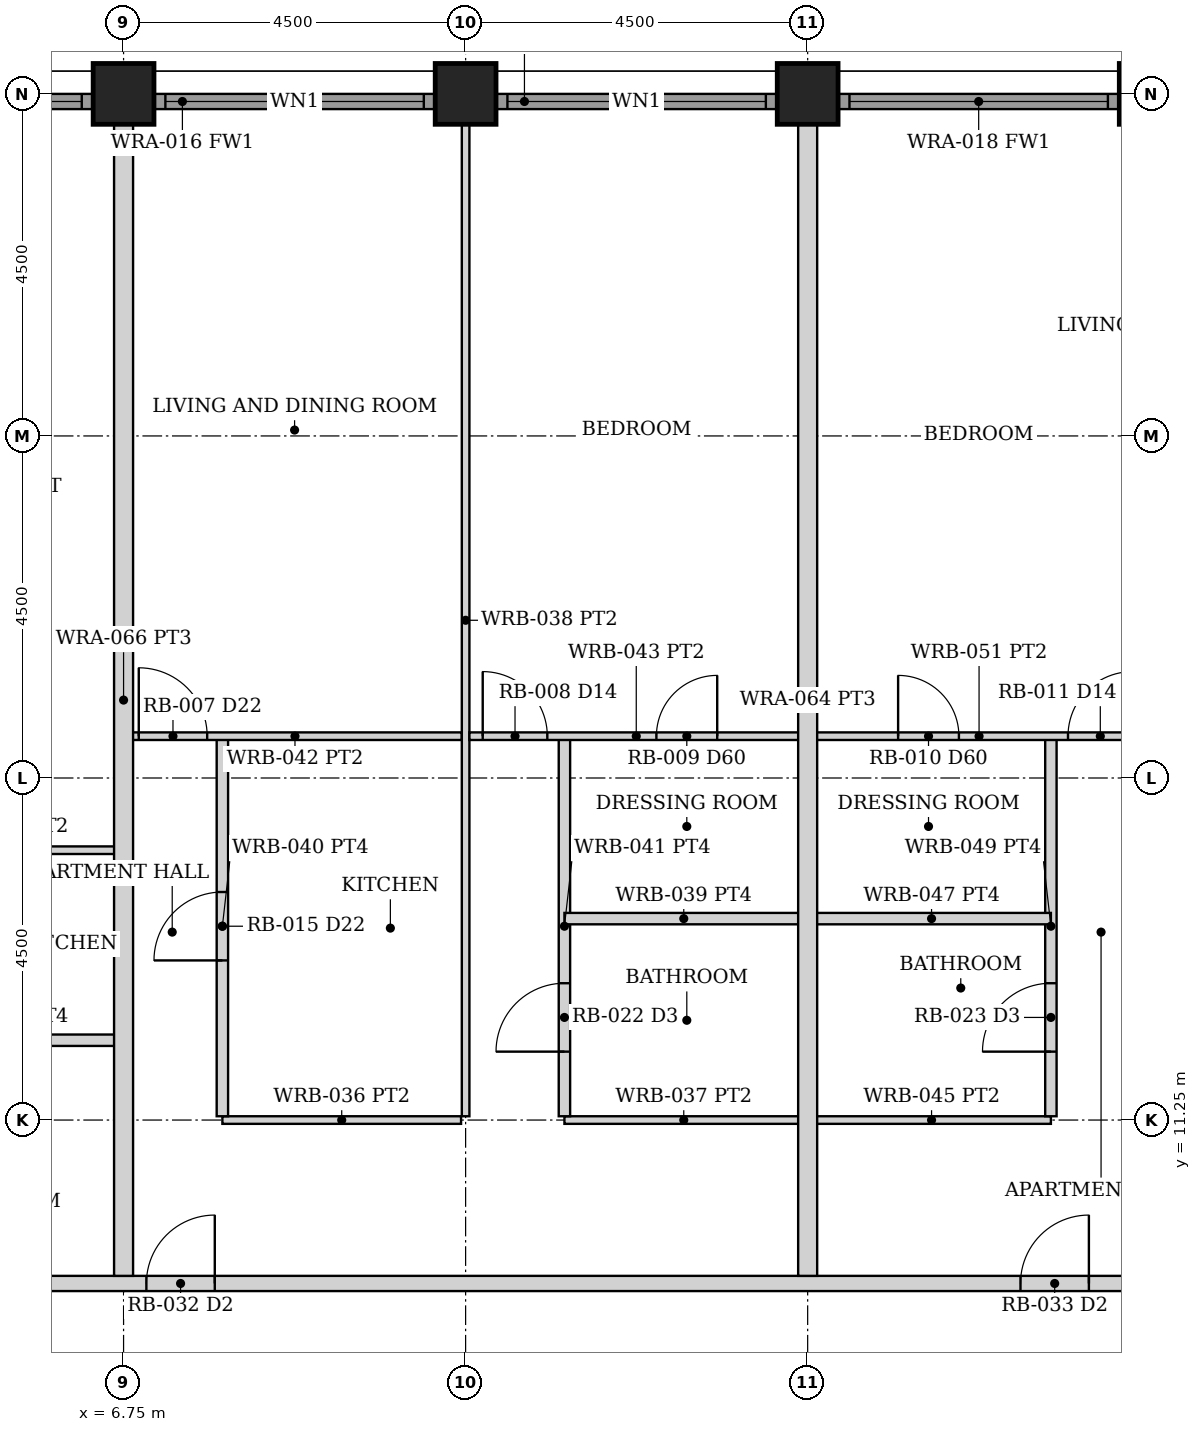
"""IFC4 building model, lengths in metres.
Left out: names, types, materials, properties, quantities, classifications, styles, units other than length and angle.
Written with IfcOpenShell. Run it as: python <this file> out.ifc"""

import sys

from ifc_helpers import new_model, si_unit, direction, frame, frame_2d, origin, origin_2d, place, context, subcontext, project, spatial, rectangle, hollow_rectangle, extrude, element, fill, save


model = new_model("IFC4")
c1 = context("Model", 3, precision=1e-05, world=origin(), true_north=direction((0.0, 1.0)))
c2 = subcontext(c1, "Body", "Model", "MODEL_VIEW")
j1 = project(units=[si_unit("LENGTHUNIT", "METRE"), si_unit("PLANEANGLEUNIT", "RADIAN")], contexts=[c1])
p1 = place(None, origin())
s1 = spatial("IfcSite", under=j1, at=p1, CompositionType="ELEMENT")
p2 = place(p1, origin())
s2 = spatial("IfcBuilding", under=s1, at=p2, CompositionType="ELEMENT")
p3 = place(p2, frame((0.0, 0.0, 37.0)))
s3 = spatial("IfcBuildingStorey", under=s2, at=p3, CompositionType="ELEMENT", Elevation=37.0)
for number, where, z_axis, x_axis in (
    (1, (6.75, 24.75, 0.0), (0.0, 0.0, 1.0), (0.0, 1.0, 0.0)),
    (2, (11.25, 24.75, 0.0), (0.0, 0.0, 1.0), (0.0, 1.0, 0.0)),
    (3, (15.75, 24.75, 0.0), (0.0, 0.0, 1.0), (0.0, 1.0, 0.0)),
    (4, (20.25, 24.75, 0.0), (0.0, 0.0, 1.0), (0.0, 1.0, 0.0)),
):
    element("IfcColumn", number, at=place(p3, frame(where, z_axis=z_axis, x_axis=x_axis)), inside=s3, PredefinedType="COLUMN", context=c2, shape_type="SweptSolid", body=[
        extrude(hollow_rectangle(XDim=0.8, YDim=0.8, WallThickness=0.07, at=origin_2d()), origin(), (0.0, 0.0, 1.0), 3.5),
    ])
p4 = place(p3, frame((2.655, 24.65, 0.0), z_axis=(0.0, 0.0, 1.0), x_axis=(1.0, 0.0, 0.0)))
e5 = element("IfcWall", 5, at=p4, inside=s3, PredefinedType="SOLIDWALL", context=c2, shape_type="SweptSolid", body=[
    extrude(rectangle(XDim=3.69, YDim=0.2, at=frame_2d((1.845, 0.0))), origin(), (0.0, 0.0, 1.0), 2.379),
])
p5 = place(p4, frame((0.145, 0.0, 0.3)))
e6 = element("IfcOpeningElement", 6, at=p5, cuts=e5, PredefinedType="OPENING", context=c2, shape_type="SweptSolid", body=[
    extrude(rectangle(XDim=3.4, YDim=1.929, at=frame_2d((1.7, 0.964))), frame((0.0, 0.11, 0.0), z_axis=(0.0, -1.0, 0.0), x_axis=(1.0, 0.0, 0.0)), (0.0, 0.0, 1.0), 0.22),
])
p6 = place(p3, frame((7.155, 24.65, 0.0), z_axis=(0.0, 0.0, 1.0), x_axis=(1.0, 0.0, 0.0)))
e7 = element("IfcWall", 7, at=p6, inside=s3, PredefinedType="SOLIDWALL", context=c2, shape_type="SweptSolid", body=[
    extrude(rectangle(XDim=3.69, YDim=0.2, at=frame_2d((1.845, 0.0))), origin(), (0.0, 0.0, 1.0), 2.379),
])
p7 = place(p6, frame((0.145, 0.0, 0.3)))
e8 = element("IfcOpeningElement", 8, at=p7, cuts=e7, PredefinedType="OPENING", context=c2, shape_type="SweptSolid", body=[
    extrude(rectangle(XDim=3.4, YDim=1.929, at=frame_2d((1.7, 0.964))), frame((0.0, 0.11, 0.0), z_axis=(0.0, -1.0, 0.0), x_axis=(1.0, 0.0, 0.0)), (0.0, 0.0, 1.0), 0.22),
])
p8 = place(p3, frame((11.655, 24.65, 0.0), z_axis=(0.0, 0.0, 1.0), x_axis=(1.0, 0.0, 0.0)))
e9 = element("IfcWall", 9, at=p8, inside=s3, PredefinedType="SOLIDWALL", context=c2, shape_type="SweptSolid", body=[
    extrude(rectangle(XDim=3.69, YDim=0.2, at=frame_2d((1.845, 0.0))), origin(), (0.0, 0.0, 1.0), 2.379),
])
p9 = place(p8, frame((0.145, 0.0, 0.3)))
e10 = element("IfcOpeningElement", 10, at=p9, cuts=e9, PredefinedType="OPENING", context=c2, shape_type="SweptSolid", body=[
    extrude(rectangle(XDim=3.4, YDim=1.929, at=frame_2d((1.7, 0.964))), frame((0.0, 0.11, 0.0), z_axis=(0.0, -1.0, 0.0), x_axis=(1.0, 0.0, 0.0)), (0.0, 0.0, 1.0), 0.22),
])
p10 = place(p3, frame((16.155, 24.65, 0.0), z_axis=(0.0, 0.0, 1.0), x_axis=(1.0, 0.0, 0.0)))
e11 = element("IfcWall", 11, at=p10, inside=s3, PredefinedType="SOLIDWALL", context=c2, shape_type="SweptSolid", body=[
    extrude(rectangle(XDim=3.69, YDim=0.2, at=frame_2d((1.845, 0.0))), origin(), (0.0, 0.0, 1.0), 2.379),
])
p11 = place(p10, frame((0.145, 0.0, 0.3)))
e12 = element("IfcOpeningElement", 12, at=p11, cuts=e11, PredefinedType="OPENING", context=c2, shape_type="SweptSolid", body=[
    extrude(rectangle(XDim=3.4, YDim=1.929, at=frame_2d((1.7, 0.964))), frame((0.0, 0.11, 0.0), z_axis=(0.0, -1.0, 0.0), x_axis=(1.0, 0.0, 0.0)), (0.0, 0.0, 1.0), 0.22),
])
p12 = place(p3, frame((-24.55, 9.1, 0.0), z_axis=(0.0, 0.0, 1.0), x_axis=(1.0, 0.0, 0.0)))
e13 = element("IfcWall", 13, at=p12, inside=s3, PredefinedType="PARTITIONING", context=c2, shape_type="SweptSolid", body=[
    extrude(rectangle(XDim=49.1, YDim=0.2, at=frame_2d((24.55, 0.0))), origin(), (0.0, 0.0, 1.0), 2.373),
])
p13 = place(p12, frame((5.1, 0.0, 0.0)))
e14 = element("IfcOpeningElement", 14, at=p13, cuts=e13, PredefinedType="OPENING", context=c2, shape_type="SweptSolid", body=[
    extrude(rectangle(XDim=0.9, YDim=2.1, at=frame_2d((0.45, 1.05))), frame((0.0, 0.11, 0.0), z_axis=(0.0, -1.0, 0.0), x_axis=(1.0, 0.0, 0.0)), (0.0, 0.0, 1.0), 0.22),
])
p14 = place(p12, frame((13.6, 0.0, 0.0)))
e15 = element("IfcOpeningElement", 15, at=p14, cuts=e13, PredefinedType="OPENING", context=c2, shape_type="SweptSolid", body=[
    extrude(rectangle(XDim=0.9, YDim=2.1, at=frame_2d((0.45, 1.05))), frame((0.0, 0.11, 0.0), z_axis=(0.0, -1.0, 0.0), x_axis=(1.0, 0.0, 0.0)), (0.0, 0.0, 1.0), 0.22),
])
p15 = place(p12, frame((18.0, 0.0, 0.0)))
e16 = element("IfcOpeningElement", 16, at=p15, cuts=e13, PredefinedType="OPENING", context=c2, shape_type="SweptSolid", body=[
    extrude(rectangle(XDim=0.9, YDim=2.1, at=frame_2d((0.45, 1.05))), frame((0.0, 0.11, 0.0), z_axis=(0.0, -1.0, 0.0), x_axis=(1.0, 0.0, 0.0)), (0.0, 0.0, 1.0), 0.22),
])
p16 = place(p12, frame((22.5, 0.0, 0.0)))
e17 = element("IfcOpeningElement", 17, at=p16, cuts=e13, PredefinedType="OPENING", context=c2, shape_type="SweptSolid", body=[
    extrude(rectangle(XDim=0.9, YDim=2.1, at=frame_2d((0.45, 1.05))), frame((0.0, 0.11, 0.0), z_axis=(0.0, -1.0, 0.0), x_axis=(1.0, 0.0, 0.0)), (0.0, 0.0, 1.0), 0.22),
])
p17 = place(p12, frame((27.0, 0.0, 0.0)))
e18 = element("IfcOpeningElement", 18, at=p17, cuts=e13, PredefinedType="OPENING", context=c2, shape_type="SweptSolid", body=[
    extrude(rectangle(XDim=0.9, YDim=2.1, at=frame_2d((0.45, 1.05))), frame((0.0, 0.11, 0.0), z_axis=(0.0, -1.0, 0.0), x_axis=(1.0, 0.0, 0.0)), (0.0, 0.0, 1.0), 0.22),
])
p18 = place(p12, frame((31.6, 0.0, 0.0)))
e19 = element("IfcOpeningElement", 19, at=p18, cuts=e13, PredefinedType="OPENING", context=c2, shape_type="SweptSolid", body=[
    extrude(rectangle(XDim=0.9, YDim=2.1, at=frame_2d((0.45, 1.05))), frame((0.0, 0.11, 0.0), z_axis=(0.0, -1.0, 0.0), x_axis=(1.0, 0.0, 0.0)), (0.0, 0.0, 1.0), 0.22),
])
p19 = place(p12, frame((43.1, 0.0, 0.0)))
e20 = element("IfcOpeningElement", 20, at=p19, cuts=e13, PredefinedType="OPENING", context=c2, shape_type="SweptSolid", body=[
    extrude(rectangle(XDim=0.9, YDim=2.1, at=frame_2d((0.45, 1.05))), frame((0.0, 0.11, 0.0), z_axis=(0.0, -1.0, 0.0), x_axis=(1.0, 0.0, 0.0)), (0.0, 0.0, 1.0), 0.22),
])
p20 = place(p3, frame((3.6, 12.3, 0.0), z_axis=(0.0, 0.0, 1.0), x_axis=(1.0, 0.0, 0.0)))
e21 = element("IfcWall", 21, at=p20, inside=s3, PredefinedType="PARTITIONING", context=c2, shape_type="SweptSolid", body=[
    extrude(rectangle(XDim=3.05, YDim=0.15, at=frame_2d((1.525, 0.0))), origin(), (0.0, 0.0, 1.0), 2.373),
])
p21 = place(p3, frame((3.6, 14.8, 0.0), z_axis=(0.0, 0.0, 1.0), x_axis=(1.0, 0.0, 0.0)))
e22 = element("IfcWall", 22, at=p21, inside=s3, PredefinedType="PARTITIONING", context=c2, shape_type="SweptSolid", body=[
    extrude(rectangle(XDim=3.05, YDim=0.1, at=frame_2d((1.525, 0.0))), origin(), (0.0, 0.0, 1.0), 2.373),
])
p22 = place(p3, frame((8.05, 11.25, 0.0), z_axis=(0.0, 0.0, 1.0), x_axis=(1.0, 0.0, 0.0)))
e23 = element("IfcWall", 23, at=p22, inside=s3, PredefinedType="PARTITIONING", context=c2, shape_type="SweptSolid", body=[
    extrude(rectangle(XDim=3.14, YDim=0.1, at=frame_2d((1.57, 0.0))), origin(), (0.0, 0.0, 1.0), 2.373),
])
p23 = place(p3, frame((8.05, 11.3, 0.0), z_axis=(0.0, 0.0, 1.0), x_axis=(0.0, 1.0, 0.0)))
e24 = element("IfcWall", 24, at=p23, inside=s3, PredefinedType="PARTITIONING", context=c2, shape_type="SweptSolid", body=[
    extrude(rectangle(XDim=5.0, YDim=0.15, at=frame_2d((2.5, 0.0))), origin(), (0.0, 0.0, 1.0), 2.373),
])
p24 = place(p23, frame((2.05, 0.0, 0.0)))
e25 = element("IfcOpeningElement", 25, at=p24, cuts=e24, PredefinedType="OPENING", context=c2, shape_type="SweptSolid", body=[
    extrude(rectangle(XDim=0.9, YDim=2.1, at=frame_2d((0.45, 1.05))), frame((0.0, 0.085, 0.0), z_axis=(0.0, -1.0, 0.0), x_axis=(1.0, 0.0, 0.0)), (0.0, 0.0, 1.0), 0.17),
])
p25 = place(p3, frame((6.81, 16.3, 0.0), z_axis=(0.0, 0.0, 1.0), x_axis=(1.0, 0.0, 0.0)))
e26 = element("IfcWall", 26, at=p25, inside=s3, PredefinedType="PARTITIONING", context=c2, shape_type="SweptSolid", body=[
    extrude(rectangle(XDim=4.39, YDim=0.1, at=frame_2d((2.195, 0.0))), origin(), (0.0, 0.0, 1.0), 2.373),
])
p26 = place(p25, frame((0.14, 0.0, 0.0)))
e27 = element("IfcOpeningElement", 27, at=p26, cuts=e26, PredefinedType="OPENING", context=c2, shape_type="SweptSolid", body=[
    extrude(rectangle(XDim=0.9, YDim=2.1, at=frame_2d((0.45, 1.05))), frame((0.0, 0.06, 0.0), z_axis=(0.0, -1.0, 0.0), x_axis=(1.0, 0.0, 0.0)), (0.0, 0.0, 1.0), 0.12),
])
p27 = place(p3, frame((11.25, 11.3, 0.0), z_axis=(0.0, 0.0, 1.0), x_axis=(0.0, 1.0, 0.0)))
e28 = element("IfcWall", 28, at=p27, inside=s3, PredefinedType="PARTITIONING", context=c2, shape_type="SweptSolid", body=[
    extrude(rectangle(XDim=13.05, YDim=0.1, at=frame_2d((6.525, 0.0))), origin(), (0.0, 0.0, 1.0), 2.373),
])
p28 = place(p3, frame((12.55, 11.25, 0.0), z_axis=(0.0, 0.0, 1.0), x_axis=(1.0, 0.0, 0.0)))
e29 = element("IfcWall", 29, at=p28, inside=s3, PredefinedType="PARTITIONING", context=c2, shape_type="SweptSolid", body=[
    extrude(rectangle(XDim=3.14, YDim=0.1, at=frame_2d((1.57, 0.0))), origin(), (0.0, 0.0, 1.0), 2.373),
])
p29 = place(p3, frame((12.55, 11.3, 0.0), z_axis=(0.0, 0.0, 1.0), x_axis=(0.0, 1.0, 0.0)))
e30 = element("IfcWall", 30, at=p29, inside=s3, PredefinedType="PARTITIONING", context=c2, shape_type="SweptSolid", body=[
    extrude(rectangle(XDim=5.0, YDim=0.15, at=frame_2d((2.5, 0.0))), origin(), (0.0, 0.0, 1.0), 2.373),
])
p30 = place(p29, frame((0.85, 0.0, 0.0)))
e31 = element("IfcOpeningElement", 31, at=p30, cuts=e30, PredefinedType="OPENING", context=c2, shape_type="SweptSolid", body=[
    extrude(rectangle(XDim=0.9, YDim=2.1, at=frame_2d((0.45, 1.05))), frame((0.0, 0.085, 0.0), z_axis=(0.0, -1.0, 0.0), x_axis=(1.0, 0.0, 0.0)), (0.0, 0.0, 1.0), 0.17),
])
p31 = place(p3, frame((11.3, 16.3, 0.0), z_axis=(0.0, 0.0, 1.0), x_axis=(1.0, 0.0, 0.0)))
e32 = element("IfcWall", 32, at=p31, inside=s3, PredefinedType="PARTITIONING", context=c2, shape_type="SweptSolid", body=[
    extrude(rectangle(XDim=4.39, YDim=0.1, at=frame_2d((2.195, 0.0))), origin(), (0.0, 0.0, 1.0), 2.373),
])
p32 = place(p31, frame((0.175, 0.0, 0.0)))
e33 = element("IfcOpeningElement", 33, at=p32, cuts=e32, PredefinedType="OPENING", context=c2, shape_type="SweptSolid", body=[
    extrude(rectangle(XDim=0.85, YDim=2.1, at=frame_2d((0.425, 1.05))), frame((0.0, 0.06, 0.0), z_axis=(0.0, -1.0, 0.0), x_axis=(1.0, 0.0, 0.0)), (0.0, 0.0, 1.0), 0.12),
])
p33 = place(p31, frame((2.46, 0.0, 0.0)))
e34 = element("IfcOpeningElement", 34, at=p33, cuts=e32, PredefinedType="OPENING", context=c2, shape_type="SweptSolid", body=[
    extrude(rectangle(XDim=0.8, YDim=2.1, at=frame_2d((0.4, 1.05))), frame((0.0, 0.06, 0.0), z_axis=(0.0, -1.0, 0.0), x_axis=(1.0, 0.0, 0.0)), (0.0, 0.0, 1.0), 0.12),
])
p34 = place(p3, frame((12.55, 13.9, 0.0), z_axis=(0.0, 0.0, 1.0), x_axis=(1.0, 0.0, 0.0)))
e35 = element("IfcWall", 35, at=p34, inside=s3, PredefinedType="PARTITIONING", context=c2, shape_type="SweptSolid", body=[
    extrude(rectangle(XDim=3.14, YDim=0.15, at=frame_2d((1.57, 0.0))), origin(), (0.0, 0.0, 1.0), 2.373),
])
p35 = place(p3, frame((15.81, 11.25, 0.0), z_axis=(0.0, 0.0, 1.0), x_axis=(1.0, 0.0, 0.0)))
e36 = element("IfcWall", 36, at=p35, inside=s3, PredefinedType="PARTITIONING", context=c2, shape_type="SweptSolid", body=[
    extrude(rectangle(XDim=3.14, YDim=0.1, at=frame_2d((1.57, 0.0))), origin(), (0.0, 0.0, 1.0), 2.373),
])
p36 = place(p3, frame((18.95, 11.3, 0.0), z_axis=(0.0, 0.0, 1.0), x_axis=(0.0, 1.0, 0.0)))
e37 = element("IfcWall", 37, at=p36, inside=s3, PredefinedType="PARTITIONING", context=c2, shape_type="SweptSolid", body=[
    extrude(rectangle(XDim=5.0, YDim=0.15, at=frame_2d((2.5, 0.0))), origin(), (0.0, 0.0, 1.0), 2.373),
])
p37 = place(p36, frame((0.85, 0.0, 0.0)))
e38 = element("IfcOpeningElement", 38, at=p37, cuts=e37, PredefinedType="OPENING", context=c2, shape_type="SweptSolid", body=[
    extrude(rectangle(XDim=0.9, YDim=2.1, at=frame_2d((0.45, 1.05))), frame((0.0, 0.085, 0.0), z_axis=(0.0, -1.0, 0.0), x_axis=(1.0, 0.0, 0.0)), (0.0, 0.0, 1.0), 0.17),
])
p38 = place(p3, frame((15.81, 16.3, 0.0), z_axis=(0.0, 0.0, 1.0), x_axis=(1.0, 0.0, 0.0)))
e39 = element("IfcWall", 39, at=p38, inside=s3, PredefinedType="PARTITIONING", context=c2, shape_type="SweptSolid", body=[
    extrude(rectangle(XDim=4.39, YDim=0.1, at=frame_2d((2.195, 0.0))), origin(), (0.0, 0.0, 1.0), 2.373),
])
p39 = place(p38, frame((3.365, 0.0, 0.0)))
e40 = element("IfcOpeningElement", 40, at=p39, cuts=e39, PredefinedType="OPENING", context=c2, shape_type="SweptSolid", body=[
    extrude(rectangle(XDim=0.85, YDim=2.1, at=frame_2d((0.425, 1.05))), frame((0.0, 0.06, 0.0), z_axis=(0.0, -1.0, 0.0), x_axis=(1.0, 0.0, 0.0)), (0.0, 0.0, 1.0), 0.12),
])
p40 = place(p38, frame((1.13, 0.0, 0.0)))
e41 = element("IfcOpeningElement", 41, at=p40, cuts=e39, PredefinedType="OPENING", context=c2, shape_type="SweptSolid", body=[
    extrude(rectangle(XDim=0.8, YDim=2.1, at=frame_2d((0.4, 1.05))), frame((0.0, 0.06, 0.0), z_axis=(0.0, -1.0, 0.0), x_axis=(1.0, 0.0, 0.0)), (0.0, 0.0, 1.0), 0.12),
])
p41 = place(p3, frame((15.81, 13.9, 0.0), z_axis=(0.0, 0.0, 1.0), x_axis=(1.0, 0.0, 0.0)))
e42 = element("IfcWall", 42, at=p41, inside=s3, PredefinedType="PARTITIONING", context=c2, shape_type="SweptSolid", body=[
    extrude(rectangle(XDim=3.14, YDim=0.15, at=frame_2d((1.57, 0.0))), origin(), (0.0, 0.0, 1.0), 2.373),
])
for number, where, z_axis, x_axis in (
    (43, (6.75, 9.2, 0.0), (0.0, 0.0, 1.0), (0.0, 1.0, 0.0)),
    (44, (15.75, 9.2, 0.0), (0.0, 0.0, 1.0), (0.0, 1.0, 0.0)),
):
    element("IfcWall", number, at=place(p3, frame(where, z_axis=z_axis, x_axis=x_axis)), inside=s3, PredefinedType="PARTITIONING", context=c2, shape_type="SweptSolid", body=[
        extrude(rectangle(XDim=15.15, YDim=0.25, at=frame_2d((7.575, 0.0))), origin(), (0.0, 0.0, 1.0), 2.373),
    ])
p42 = place(p5, origin())
e45 = element("IfcWindow", 45, at=p42, inside=s3, PartitioningType="SINGLE_PANEL", PredefinedType="WINDOW", context=c2, shape_type="SweptSolid", body=[
    extrude(rectangle(XDim=3.4, YDim=1.929, at=frame_2d((1.7, 0.964))), frame((0.0, 0.03, 0.0), z_axis=(0.0, -1.0, 0.0), x_axis=(1.0, 0.0, 0.0)), (0.0, 0.0, 1.0), 0.06),
])
fill(e6, e45)
p43 = place(p7, origin())
e46 = element("IfcWindow", 46, at=p43, inside=s3, PartitioningType="SINGLE_PANEL", PredefinedType="WINDOW", context=c2, shape_type="SweptSolid", body=[
    extrude(rectangle(XDim=3.4, YDim=1.929, at=frame_2d((1.7, 0.964))), frame((0.0, 0.03, 0.0), z_axis=(0.0, -1.0, 0.0), x_axis=(1.0, 0.0, 0.0)), (0.0, 0.0, 1.0), 0.06),
])
fill(e8, e46)
p44 = place(p9, origin())
e47 = element("IfcWindow", 47, at=p44, inside=s3, PartitioningType="SINGLE_PANEL", PredefinedType="WINDOW", context=c2, shape_type="SweptSolid", body=[
    extrude(rectangle(XDim=3.4, YDim=1.929, at=frame_2d((1.7, 0.964))), frame((0.0, 0.03, 0.0), z_axis=(0.0, -1.0, 0.0), x_axis=(1.0, 0.0, 0.0)), (0.0, 0.0, 1.0), 0.06),
])
fill(e10, e47)
p45 = place(p11, origin())
e48 = element("IfcWindow", 48, at=p45, inside=s3, PartitioningType="SINGLE_PANEL", PredefinedType="WINDOW", context=c2, shape_type="SweptSolid", body=[
    extrude(rectangle(XDim=3.4, YDim=1.929, at=frame_2d((1.7, 0.964))), frame((0.0, 0.03, 0.0), z_axis=(0.0, -1.0, 0.0), x_axis=(1.0, 0.0, 0.0)), (0.0, 0.0, 1.0), 0.06),
])
fill(e12, e48)
p46 = place(p18, origin())
e49 = element("IfcDoor", 49, at=p46, inside=s3, OperationType="SINGLE_SWING_RIGHT", PredefinedType="DOOR", context=c2, shape_type="SweptSolid", body=[
    extrude(rectangle(XDim=0.9, YDim=2.1, at=frame_2d((0.45, 1.05))), frame((0.0, 0.025, 0.0), z_axis=(0.0, -1.0, 0.0), x_axis=(1.0, 0.0, 0.0)), (0.0, 0.0, 1.0), 0.05),
])
fill(e19, e49)
p47 = place(p24, origin())
e50 = element("IfcDoor", 50, at=p47, inside=s3, OperationType="SINGLE_SWING_LEFT", PredefinedType="DOOR", context=c2, shape_type="SweptSolid", body=[
    extrude(rectangle(XDim=0.9, YDim=2.1, at=frame_2d((0.45, 1.05))), frame((0.0, 0.025, 0.0), z_axis=(0.0, -1.0, 0.0), x_axis=(1.0, 0.0, 0.0)), (0.0, 0.0, 1.0), 0.05),
])
fill(e25, e50)
p48 = place(p26, origin())
e51 = element("IfcDoor", 51, at=p48, inside=s3, OperationType="SINGLE_SWING_LEFT", PredefinedType="DOOR", context=c2, shape_type="SweptSolid", body=[
    extrude(rectangle(XDim=0.9, YDim=2.1, at=frame_2d((0.45, 1.05))), frame((0.0, 0.025, 0.0), z_axis=(0.0, -1.0, 0.0), x_axis=(1.0, 0.0, 0.0)), (0.0, 0.0, 1.0), 0.05),
])
fill(e27, e51)
p49 = place(p32, origin())
e52 = element("IfcDoor", 52, at=p49, inside=s3, OperationType="SINGLE_SWING_LEFT", PredefinedType="DOOR", context=c2, shape_type="SweptSolid", body=[
    extrude(rectangle(XDim=0.85, YDim=2.1, at=frame_2d((0.425, 1.05))), frame((0.0, 0.025, 0.0), z_axis=(0.0, -1.0, 0.0), x_axis=(1.0, 0.0, 0.0)), (0.0, 0.0, 1.0), 0.05),
])
fill(e33, e52)
p50 = place(p30, origin())
e53 = element("IfcDoor", 53, at=p50, inside=s3, OperationType="SINGLE_SWING_LEFT", PredefinedType="DOOR", context=c2, shape_type="SweptSolid", body=[
    extrude(rectangle(XDim=0.9, YDim=2.1, at=frame_2d((0.45, 1.05))), frame((0.0, 0.025, 0.0), z_axis=(0.0, -1.0, 0.0), x_axis=(1.0, 0.0, 0.0)), (0.0, 0.0, 1.0), 0.05),
])
fill(e31, e53)
p51 = place(p33, origin())
e54 = element("IfcDoor", 54, at=p51, inside=s3, OperationType="SINGLE_SWING_RIGHT", PredefinedType="DOOR", context=c2, shape_type="SweptSolid", body=[
    extrude(rectangle(XDim=0.8, YDim=2.1, at=frame_2d((0.4, 1.05))), frame((0.0, 0.025, 0.0), z_axis=(0.0, -1.0, 0.0), x_axis=(1.0, 0.0, 0.0)), (0.0, 0.0, 1.0), 0.05),
])
fill(e34, e54)
p52 = place(p19, origin())
e55 = element("IfcDoor", 55, at=p52, inside=s3, OperationType="SINGLE_SWING_RIGHT", PredefinedType="DOOR", context=c2, shape_type="SweptSolid", body=[
    extrude(rectangle(XDim=0.9, YDim=2.1, at=frame_2d((0.45, 1.05))), frame((0.0, 0.025, 0.0), z_axis=(0.0, -1.0, 0.0), x_axis=(1.0, 0.0, 0.0)), (0.0, 0.0, 1.0), 0.05),
])
fill(e20, e55)
p53 = place(p39, origin())
e56 = element("IfcDoor", 56, at=p53, inside=s3, OperationType="SINGLE_SWING_RIGHT", PredefinedType="DOOR", context=c2, shape_type="SweptSolid", body=[
    extrude(rectangle(XDim=0.85, YDim=2.1, at=frame_2d((0.425, 1.05))), frame((0.0, 0.025, 0.0), z_axis=(0.0, -1.0, 0.0), x_axis=(1.0, 0.0, 0.0)), (0.0, 0.0, 1.0), 0.05),
])
fill(e40, e56)
p54 = place(p37, origin())
e57 = element("IfcDoor", 57, at=p54, inside=s3, OperationType="SINGLE_SWING_LEFT", PredefinedType="DOOR", context=c2, shape_type="SweptSolid", body=[
    extrude(rectangle(XDim=0.9, YDim=2.1, at=frame_2d((0.45, 1.05))), frame((0.0, 0.025, 0.0), z_axis=(0.0, -1.0, 0.0), x_axis=(1.0, 0.0, 0.0)), (0.0, 0.0, 1.0), 0.05),
])
fill(e38, e57)
p55 = place(p40, origin())
e58 = element("IfcDoor", 58, at=p55, inside=s3, OperationType="SINGLE_SWING_LEFT", PredefinedType="DOOR", context=c2, shape_type="SweptSolid", body=[
    extrude(rectangle(XDim=0.8, YDim=2.1, at=frame_2d((0.4, 1.05))), frame((0.0, 0.025, 0.0), z_axis=(0.0, -1.0, 0.0), x_axis=(1.0, 0.0, 0.0)), (0.0, 0.0, 1.0), 0.05),
])
fill(e41, e58)
save(model, sys.argv[1])
